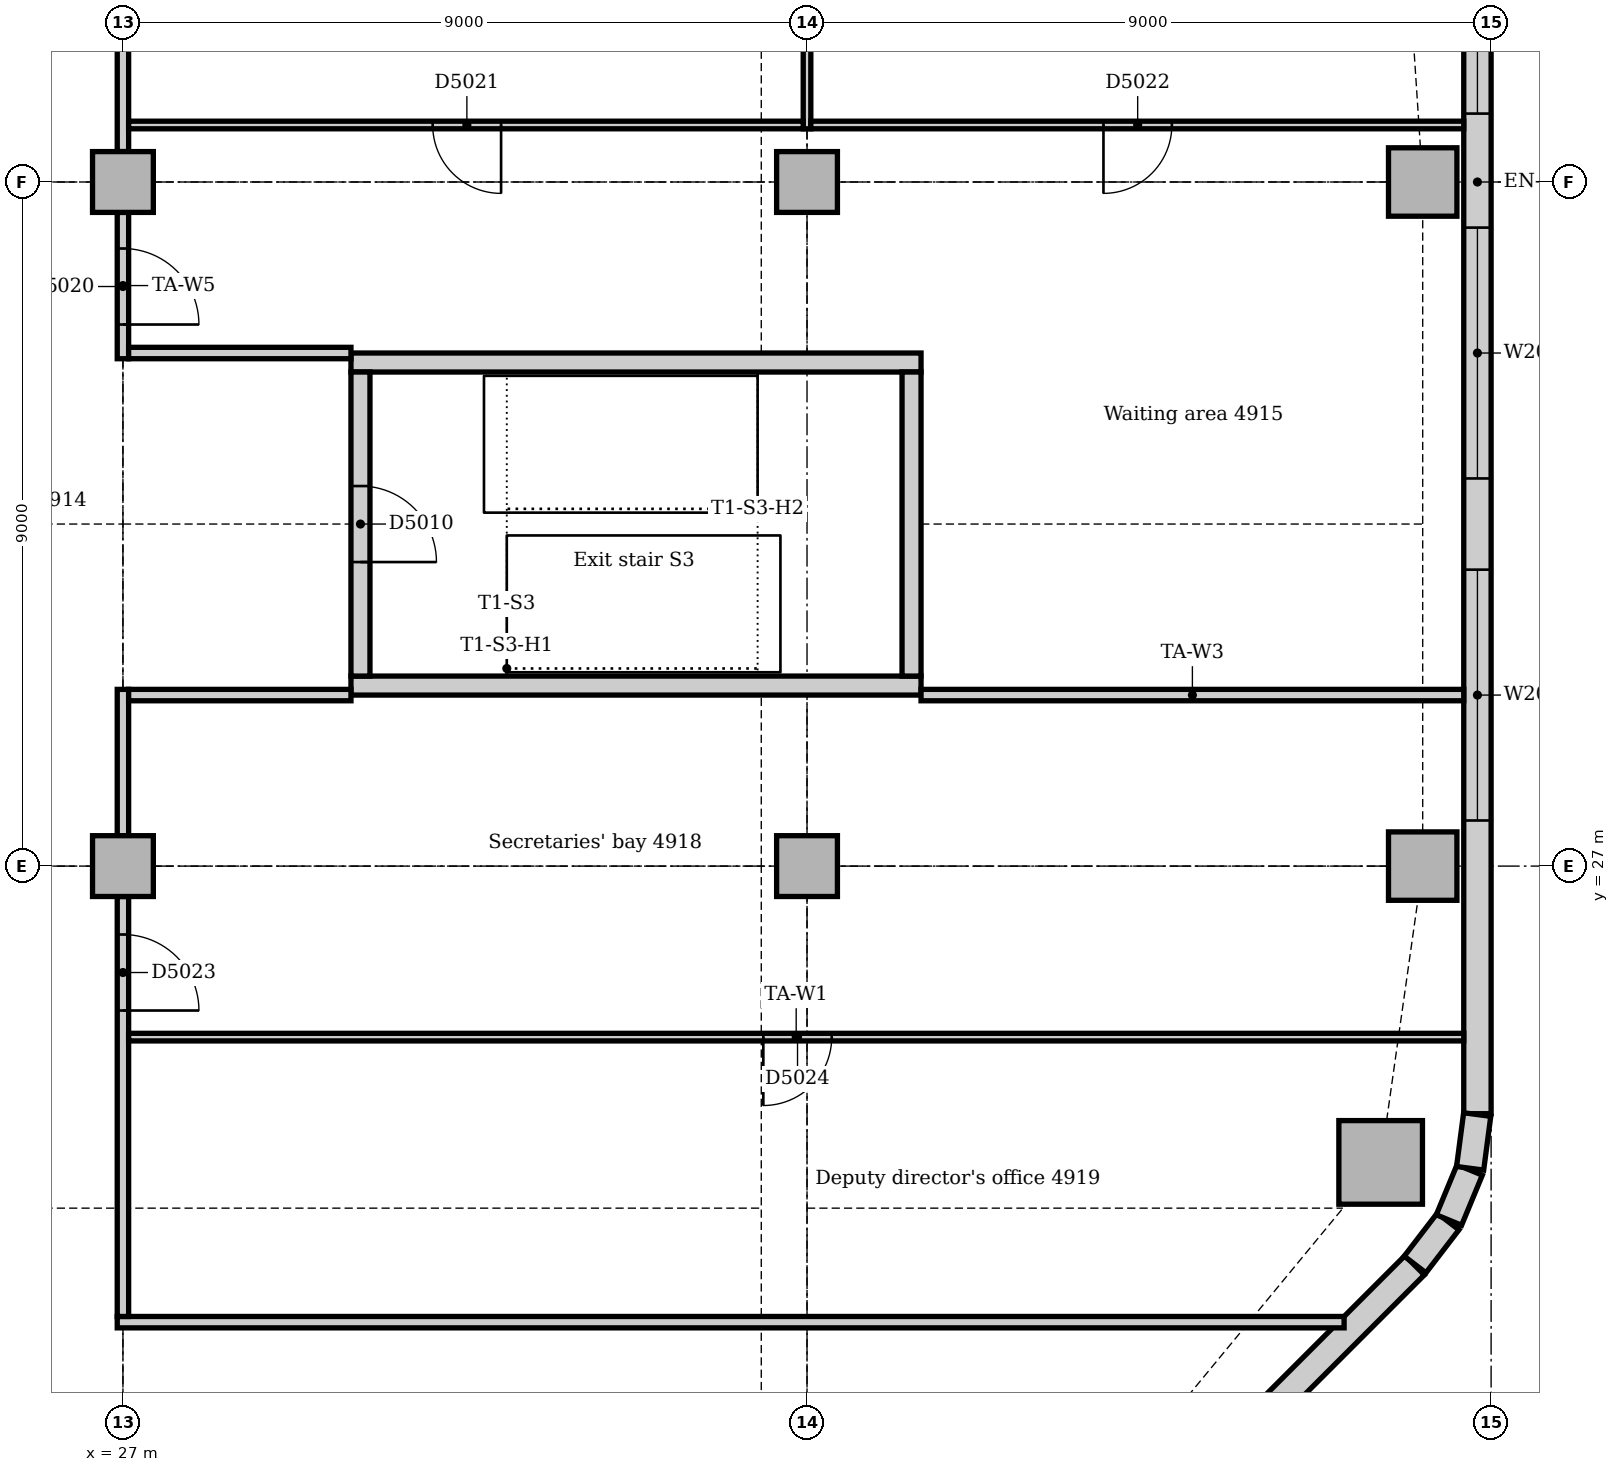
"""IFC4 building model, lengths in metres.
Left out: names, types, materials, properties, quantities, classifications, styles, units other than length and angle.
Written with IfcOpenShell. Run it as: python <this file> out.ifc"""

import sys

from ifc_helpers import new_model, si_unit, direction, frame, frame_2d, origin, origin_2d, place, context, subcontext, project, spatial, rectangle, extrude, element, fill, save


model = new_model("IFC4")
c1 = context("Model", 3, precision=1e-05, world=origin(), true_north=direction((0.0, 1.0)))
c2 = subcontext(c1, "Body", "Model", "MODEL_VIEW")
j1 = project(units=[si_unit("LENGTHUNIT", "METRE"), si_unit("PLANEANGLEUNIT", "RADIAN")], contexts=[c1])
p1 = place(None, origin())
s1 = spatial("IfcSite", under=j1, at=p1, CompositionType="ELEMENT")
p2 = place(p1, origin())
s2 = spatial("IfcBuilding", under=s1, at=p2, CompositionType="ELEMENT")
p3 = place(p2, frame((0.0, 0.0, 206.0)))
s3 = spatial("IfcBuildingStorey", under=s2, at=p3, CompositionType="ELEMENT", Elevation=206.0)
for number, where, z_axis, x_axis in (
    (1, (30.0, 29.375, 0.0), (0.0, 0.0, 1.0), (1.0, 0.0, 0.0)),
    (2, (37.5, 33.625, 0.0), (0.0, 0.0, 1.0), (-1.0, 0.0, 0.0)),
):
    element("IfcWall", number, at=place(p3, frame(where, z_axis=z_axis, x_axis=x_axis)), inside=s3, PredefinedType="SOLIDWALL", context=c2, shape_type="SweptSolid", body=[
        extrude(rectangle(XDim=7.5, YDim=0.25, at=frame_2d((3.75, 0.0))), origin(), (0.0, 0.0, 1.0), 4.0),
    ])
p4 = place(p3, frame((37.375, 29.5, 0.0), z_axis=(0.0, 0.0, 1.0), x_axis=(0.0, 1.0, 0.0)))
e3 = element("IfcWall", 3, at=p4, inside=s3, PredefinedType="SOLIDWALL", context=c2, shape_type="SweptSolid", body=[
    extrude(rectangle(XDim=4.0, YDim=0.25, at=frame_2d((2.0, 0.0))), origin(), (0.0, 0.0, 1.0), 4.0),
])
p5 = place(p3, frame((30.125, 33.5, 0.0), z_axis=(0.0, 0.0, 1.0), x_axis=(0.0, -1.0, 0.0)))
e4 = element("IfcWall", 4, at=p5, inside=s3, PredefinedType="SOLIDWALL", context=c2, shape_type="SweptSolid", body=[
    extrude(rectangle(XDim=4.0, YDim=0.25, at=frame_2d((2.0, 0.0))), origin(), (0.0, 0.0, 1.0), 4.0),
])
p6 = place(p5, frame((1.5, 0.0, 0.0)))
e5 = element("IfcOpeningElement", 5, at=p6, cuts=e4, PredefinedType="OPENING", context=c2, shape_type="SweptSolid", body=[
    extrude(rectangle(XDim=1.0, YDim=2.1, at=frame_2d((0.5, 1.05))), frame((0.0, 0.135, 0.0), z_axis=(0.0, -1.0, 0.0), x_axis=(1.0, 0.0, 0.0)), (0.0, 0.0, 1.0), 0.27),
])
p7 = place(p3, frame((43.547, 23.102, 0.0), z_axis=(0.0, 0.0, 1.0), x_axis=(1.0, 0.0, 0.0)))
e6 = element("IfcColumn", 6, at=p7, inside=s3, PredefinedType="COLUMN", context=c2, shape_type="SweptSolid", body=[
    extrude(rectangle(XDim=1.1, YDim=1.1, at=origin_2d()), origin(), (0.0, 0.0, 1.0), 3.85),
])
for number, where, z_axis, x_axis in (
    (7, (44.1, 27.0, 0.0), (0.0, 0.0, 1.0), (1.0, 0.0, 0.0)),
    (8, (44.1, 36.0, 0.0), (0.0, 0.0, 1.0), (1.0, 0.0, 0.0)),
):
    element("IfcColumn", number, at=place(p3, frame(where, z_axis=z_axis, x_axis=x_axis)), inside=s3, PredefinedType="COLUMN", context=c2, shape_type="SweptSolid", body=[
        extrude(rectangle(XDim=0.9, YDim=0.9, at=origin_2d()), origin(), (0.0, 0.0, 1.0), 3.85),
    ])
for number, where, z_axis, x_axis in (
    (9, (27.0, 27.0, 0.0), (0.0, 0.0, 1.0), (1.0, 0.0, 0.0)),
    (10, (27.0, 36.0, 0.0), (0.0, 0.0, 1.0), (1.0, 0.0, 0.0)),
    (11, (36.0, 27.0, 0.0), (0.0, 0.0, 1.0), (1.0, 0.0, 0.0)),
    (12, (36.0, 36.0, 0.0), (0.0, 0.0, 1.0), (1.0, 0.0, 0.0)),
):
    element("IfcColumn", number, at=place(p3, frame(where, z_axis=z_axis, x_axis=x_axis)), inside=s3, PredefinedType="COLUMN", context=c2, shape_type="SweptSolid", body=[
        extrude(rectangle(XDim=0.8, YDim=0.8, at=origin_2d()), origin(), (0.0, 0.0, 1.0), 3.85),
    ])
p8 = place(p3, frame((36.751, 14.506, 0.0), z_axis=(0.0, 0.0, 1.0), x_axis=(0.707106781187, 0.707106781187, 0.0)))
e13 = element("IfcWall", 13, at=p8, inside=s3, PredefinedType="STANDARD", context=c2, shape_type="SweptSolid", body=[
    extrude(rectangle(XDim=10.243, YDim=0.36, at=frame_2d((5.121, 0.0))), origin(), (0.0, 0.0, 1.0), 3.85),
])
p9 = place(p8, frame((5.021, 0.0, 0.9)))
e14 = element("IfcOpeningElement", 14, at=p9, cuts=e13, PredefinedType="OPENING", context=c2, shape_type="SweptSolid", body=[
    extrude(rectangle(XDim=1.8, YDim=1.6, at=frame_2d((0.9, 0.8))), frame((0.0, 0.19, 0.0), z_axis=(0.0, -1.0, 0.0), x_axis=(1.0, 0.0, 0.0)), (0.0, 0.0, 1.0), 0.38),
])
p10 = place(p3, frame((44.82, 23.743, 0.0), z_axis=(0.0, 0.0, 1.0), x_axis=(0.0, 1.0, 0.0)))
e15 = element("IfcWall", 15, at=p10, inside=s3, PredefinedType="STANDARD", context=c2, shape_type="SweptSolid", body=[
    extrude(rectangle(XDim=24.515, YDim=0.36, at=frame_2d((12.257, 0.0))), origin(), (0.0, 0.0, 1.0), 3.85),
])
p11 = place(p10, frame((3.857, 0.0, 0.9)))
e16 = element("IfcOpeningElement", 16, at=p11, cuts=e15, PredefinedType="OPENING", context=c2, shape_type="SweptSolid", body=[
    extrude(rectangle(XDim=3.3, YDim=1.6, at=frame_2d((1.65, 0.8))), frame((0.0, 0.19, 0.0), z_axis=(0.0, -1.0, 0.0), x_axis=(1.0, 0.0, 0.0)), (0.0, 0.0, 1.0), 0.38),
])
p12 = place(p10, frame((8.357, 0.0, 0.9)))
e17 = element("IfcOpeningElement", 17, at=p12, cuts=e15, PredefinedType="OPENING", context=c2, shape_type="SweptSolid", body=[
    extrude(rectangle(XDim=3.3, YDim=1.6, at=frame_2d((1.65, 0.8))), frame((0.0, 0.19, 0.0), z_axis=(0.0, -1.0, 0.0), x_axis=(1.0, 0.0, 0.0)), (0.0, 0.0, 1.0), 0.38),
])
p13 = place(p10, frame((13.157, 0.0, 0.9)))
e18 = element("IfcOpeningElement", 18, at=p13, cuts=e15, PredefinedType="OPENING", context=c2, shape_type="SweptSolid", body=[
    extrude(rectangle(XDim=3.3, YDim=1.6, at=frame_2d((1.65, 0.8))), frame((0.0, 0.19, 0.0), z_axis=(0.0, -1.0, 0.0), x_axis=(1.0, 0.0, 0.0)), (0.0, 0.0, 1.0), 0.38),
])
p14 = place(p10, frame((17.357, 0.0, 0.9)))
e19 = element("IfcOpeningElement", 19, at=p14, cuts=e15, PredefinedType="OPENING", context=c2, shape_type="SweptSolid", body=[
    extrude(rectangle(XDim=3.3, YDim=1.6, at=frame_2d((1.65, 0.8))), frame((0.0, 0.19, 0.0), z_axis=(0.0, -1.0, 0.0), x_axis=(1.0, 0.0, 0.0)), (0.0, 0.0, 1.0), 0.38),
])
p15 = place(p3, frame((44.0, 21.759, 0.0), z_axis=(0.0, 0.0, 1.0), x_axis=(0.608802368033, 0.793321924995, 0.0)))
e20 = element("IfcWall", 20, at=p15, inside=s3, PredefinedType="STANDARD", context=c2, shape_type="SweptSolid", body=[
    extrude(rectangle(XDim=0.713, YDim=0.36, at=frame_2d((0.357, 0.0))), origin(), (0.0, 0.0, 1.0), 3.85),
])
for number, where, z_axis, x_axis in (
    (21, (44.445, 22.344, 0.0), (0.0, 0.0, 1.0), (0.383, 0.924, 0.0)),
    (22, (44.724, 23.024, 0.0), (0.0, 0.0, 1.0), (0.131, 0.991, 0.0)),
):
    element("IfcWall", number, at=place(p3, frame(where, z_axis=z_axis, x_axis=x_axis)), inside=s3, PredefinedType="STANDARD", context=c2, shape_type="SweptSolid", body=[
        extrude(rectangle(XDim=0.713, YDim=0.36, at=frame_2d((0.356, 0.0))), origin(), (0.0, 0.0, 1.0), 3.85),
    ])
p16 = place(p3, frame((26.925, 21.0, 0.0), z_axis=(0.0, 0.0, 1.0), x_axis=(1.0, 0.0, 0.0)))
e23 = element("IfcWall", 23, at=p16, inside=s3, PredefinedType="PARTITIONING", context=c2, shape_type="SweptSolid", body=[
    extrude(rectangle(XDim=16.141, YDim=0.15, at=frame_2d((8.07, 0.0))), origin(), (0.0, 0.0, 1.0), 3.85),
])
p17 = place(p3, frame((27.0, 33.675, 0.0), z_axis=(0.0, 0.0, 1.0), x_axis=(0.0, 1.0, 0.0)))
e24 = element("IfcWall", 24, at=p17, inside=s3, PredefinedType="PARTITIONING", context=c2, shape_type="SweptSolid", body=[
    extrude(rectangle(XDim=1.925, YDim=0.15, at=frame_2d((0.963, 0.0))), origin(), (0.0, 0.0, 1.0), 3.35),
])
p18 = place(p17, frame((0.45, 0.0, 0.0)))
e25 = element("IfcOpeningElement", 25, at=p18, cuts=e24, PredefinedType="OPENING", context=c2, shape_type="SweptSolid", body=[
    extrude(rectangle(XDim=1.0, YDim=2.1, at=frame_2d((0.5, 1.05))), frame((0.0, 0.085, 0.0), z_axis=(0.0, -1.0, 0.0), x_axis=(1.0, 0.0, 0.0)), (0.0, 0.0, 1.0), 0.17),
])
p19 = place(p3, frame((27.0, 36.4, 0.0), z_axis=(0.0, 0.0, 1.0), x_axis=(0.0, 1.0, 0.0)))
e26 = element("IfcWall", 26, at=p19, inside=s3, PredefinedType="PARTITIONING", context=c2, shape_type="SweptSolid", body=[
    extrude(rectangle(XDim=7.3, YDim=0.15, at=frame_2d((3.65, 0.0))), origin(), (0.0, 0.0, 1.0), 3.35),
])
p20 = place(p3, frame((27.0, 21.075, 0.0), z_axis=(0.0, 0.0, 1.0), x_axis=(0.0, 1.0, 0.0)))
e27 = element("IfcWall", 27, at=p20, inside=s3, PredefinedType="PARTITIONING", context=c2, shape_type="SweptSolid", body=[
    extrude(rectangle(XDim=5.525, YDim=0.15, at=frame_2d((2.763, 0.0))), origin(), (0.0, 0.0, 1.0), 3.35),
])
p21 = place(p20, frame((4.025, 0.0, 0.0)))
e28 = element("IfcOpeningElement", 28, at=p21, cuts=e27, PredefinedType="OPENING", context=c2, shape_type="SweptSolid", body=[
    extrude(rectangle(XDim=1.0, YDim=2.1, at=frame_2d((0.5, 1.05))), frame((0.0, 0.085, 0.0), z_axis=(0.0, -1.0, 0.0), x_axis=(1.0, 0.0, 0.0)), (0.0, 0.0, 1.0), 0.17),
])
p22 = place(p3, frame((27.0, 27.4, 0.0), z_axis=(0.0, 0.0, 1.0), x_axis=(0.0, 1.0, 0.0)))
e29 = element("IfcWall", 29, at=p22, inside=s3, PredefinedType="PARTITIONING", context=c2, shape_type="SweptSolid", body=[
    extrude(rectangle(XDim=1.925, YDim=0.15, at=frame_2d((0.963, 0.0))), origin(), (0.0, 0.0, 1.0), 3.35),
])
for number, where, z_axis, x_axis in (
    (30, (27.075, 29.25, 0.0), (0.0, 0.0, 1.0), (1.0, 0.0, 0.0)),
    (31, (27.075, 33.75, 0.0), (0.0, 0.0, 1.0), (1.0, 0.0, 0.0)),
):
    element("IfcWall", number, at=place(p3, frame(where, z_axis=z_axis, x_axis=x_axis)), inside=s3, PredefinedType="PARTITIONING", context=c2, shape_type="SweptSolid", body=[
        extrude(rectangle(XDim=2.925, YDim=0.15, at=frame_2d((1.462, 0.0))), origin(), (0.0, 0.0, 1.0), 3.85),
    ])
p23 = place(p3, frame((37.5, 29.25, 0.0), z_axis=(0.0, 0.0, 1.0), x_axis=(1.0, 0.0, 0.0)))
e32 = element("IfcWall", 32, at=p23, inside=s3, PredefinedType="PARTITIONING", context=c2, shape_type="SweptSolid", body=[
    extrude(rectangle(XDim=7.14, YDim=0.15, at=frame_2d((3.57, 0.0))), origin(), (0.0, 0.0, 1.0), 3.85),
])
p24 = place(p3, frame((36.0, 36.7, 0.0), z_axis=(0.0, 0.0, 1.0), x_axis=(0.0, 1.0, 0.0)))
e33 = element("IfcWall", 33, at=p24, inside=s3, PredefinedType="PARTITIONING", context=c2, shape_type="SweptSolid", body=[
    extrude(rectangle(XDim=7.0, YDim=0.1, at=frame_2d((3.5, 0.0))), origin(), (0.0, 0.0, 1.0), 3.35),
])
p25 = place(p3, frame((27.075, 24.75, 0.0), z_axis=(0.0, 0.0, 1.0), x_axis=(1.0, 0.0, 0.0)))
e34 = element("IfcWall", 34, at=p25, inside=s3, PredefinedType="PARTITIONING", context=c2, shape_type="SweptSolid", body=[
    extrude(rectangle(XDim=17.565, YDim=0.1, at=frame_2d((8.783, 0.0))), origin(), (0.0, 0.0, 1.0), 3.85),
])
p26 = place(p25, frame((8.35, 0.0, 0.0)))
e35 = element("IfcOpeningElement", 35, at=p26, cuts=e34, PredefinedType="OPENING", context=c2, shape_type="SweptSolid", body=[
    extrude(rectangle(XDim=0.9, YDim=2.1, at=frame_2d((0.45, 1.05))), frame((0.0, 0.06, 0.0), z_axis=(0.0, -1.0, 0.0), x_axis=(1.0, 0.0, 0.0)), (0.0, 0.0, 1.0), 0.12),
])
p27 = place(p3, frame((27.075, 36.75, 0.0), z_axis=(0.0, 0.0, 1.0), x_axis=(1.0, 0.0, 0.0)))
e36 = element("IfcWall", 36, at=p27, inside=s3, PredefinedType="PARTITIONING", context=c2, shape_type="SweptSolid", body=[
    extrude(rectangle(XDim=8.875, YDim=0.1, at=frame_2d((4.438, 0.0))), origin(), (0.0, 0.0, 1.0), 3.85),
])
p28 = place(p27, frame((4.0, 0.0, 0.0)))
e37 = element("IfcOpeningElement", 37, at=p28, cuts=e36, PredefinedType="OPENING", context=c2, shape_type="SweptSolid", body=[
    extrude(rectangle(XDim=0.9, YDim=2.1, at=frame_2d((0.45, 1.05))), frame((0.0, 0.06, 0.0), z_axis=(0.0, -1.0, 0.0), x_axis=(1.0, 0.0, 0.0)), (0.0, 0.0, 1.0), 0.12),
])
p29 = place(p3, frame((36.05, 36.75, 0.0), z_axis=(0.0, 0.0, 1.0), x_axis=(1.0, 0.0, 0.0)))
e38 = element("IfcWall", 38, at=p29, inside=s3, PredefinedType="PARTITIONING", context=c2, shape_type="SweptSolid", body=[
    extrude(rectangle(XDim=8.59, YDim=0.1, at=frame_2d((4.295, 0.0))), origin(), (0.0, 0.0, 1.0), 3.85),
])
p30 = place(p29, frame((3.85, 0.0, 0.0)))
e39 = element("IfcOpeningElement", 39, at=p30, cuts=e38, PredefinedType="OPENING", context=c2, shape_type="SweptSolid", body=[
    extrude(rectangle(XDim=0.9, YDim=2.1, at=frame_2d((0.45, 1.05))), frame((0.0, 0.06, 0.0), z_axis=(0.0, -1.0, 0.0), x_axis=(1.0, 0.0, 0.0)), (0.0, 0.0, 1.0), 0.12),
])
p31 = place(p11, origin())
e40 = element("IfcWindow", 40, at=p31, inside=s3, PartitioningType="SINGLE_PANEL", PredefinedType="WINDOW", context=c2, shape_type="SweptSolid", body=[
    extrude(rectangle(XDim=3.3, YDim=1.6, at=frame_2d((1.65, 0.8))), frame((0.0, 0.13, 0.0), z_axis=(0.0, -1.0, 0.0), x_axis=(1.0, 0.0, 0.0)), (0.0, 0.0, 1.0), 0.06),
])
fill(e16, e40)
p32 = place(p12, origin())
e41 = element("IfcWindow", 41, at=p32, inside=s3, PartitioningType="SINGLE_PANEL", PredefinedType="WINDOW", context=c2, shape_type="SweptSolid", body=[
    extrude(rectangle(XDim=3.3, YDim=1.6, at=frame_2d((1.65, 0.8))), frame((0.0, 0.13, 0.0), z_axis=(0.0, -1.0, 0.0), x_axis=(1.0, 0.0, 0.0)), (0.0, 0.0, 1.0), 0.06),
])
fill(e17, e41)
p33 = place(p13, origin())
e42 = element("IfcWindow", 42, at=p33, inside=s3, PartitioningType="SINGLE_PANEL", PredefinedType="WINDOW", context=c2, shape_type="SweptSolid", body=[
    extrude(rectangle(XDim=3.3, YDim=1.6, at=frame_2d((1.65, 0.8))), frame((0.0, 0.13, 0.0), z_axis=(0.0, -1.0, 0.0), x_axis=(1.0, 0.0, 0.0)), (0.0, 0.0, 1.0), 0.06),
])
fill(e18, e42)
p34 = place(p6, origin())
e43 = element("IfcDoor", 43, at=p34, inside=s3, OperationType="SINGLE_SWING_RIGHT", PredefinedType="DOOR", context=c2, shape_type="SweptSolid", body=[
    extrude(rectangle(XDim=1.0, YDim=2.1, at=frame_2d((0.5, 1.05))), frame((0.0, 0.025, 0.0), z_axis=(0.0, -1.0, 0.0), x_axis=(1.0, 0.0, 0.0)), (0.0, 0.0, 1.0), 0.05),
])
fill(e5, e43)
p35 = place(p18, frame((1.0, 0.0, 0.0), z_axis=(0.0, 0.0, 1.0), x_axis=(-1.0, 0.0, 0.0)))
e44 = element("IfcDoor", 44, at=p35, inside=s3, OperationType="SINGLE_SWING_RIGHT", PredefinedType="DOOR", context=c2, shape_type="SweptSolid", body=[
    extrude(rectangle(XDim=1.0, YDim=2.1, at=frame_2d((0.5, 1.05))), frame((0.0, 0.025, 0.0), z_axis=(0.0, -1.0, 0.0), x_axis=(1.0, 0.0, 0.0)), (0.0, 0.0, 1.0), 0.05),
])
fill(e25, e44)
p36 = place(p28, frame((0.9, 0.0, 0.0), z_axis=(0.0, 0.0, 1.0), x_axis=(-1.0, 0.0, 0.0)))
e45 = element("IfcDoor", 45, at=p36, inside=s3, OperationType="SINGLE_SWING_LEFT", PredefinedType="DOOR", context=c2, shape_type="SweptSolid", body=[
    extrude(rectangle(XDim=0.9, YDim=2.1, at=frame_2d((0.45, 1.05))), frame((0.0, 0.025, 0.0), z_axis=(0.0, -1.0, 0.0), x_axis=(1.0, 0.0, 0.0)), (0.0, 0.0, 1.0), 0.05),
])
fill(e37, e45)
p37 = place(p30, frame((0.9, 0.0, 0.0), z_axis=(0.0, 0.0, 1.0), x_axis=(-1.0, 0.0, 0.0)))
e46 = element("IfcDoor", 46, at=p37, inside=s3, OperationType="SINGLE_SWING_RIGHT", PredefinedType="DOOR", context=c2, shape_type="SweptSolid", body=[
    extrude(rectangle(XDim=0.9, YDim=2.1, at=frame_2d((0.45, 1.05))), frame((0.0, 0.025, 0.0), z_axis=(0.0, -1.0, 0.0), x_axis=(1.0, 0.0, 0.0)), (0.0, 0.0, 1.0), 0.05),
])
fill(e39, e46)
p38 = place(p21, frame((1.0, 0.0, 0.0), z_axis=(0.0, 0.0, 1.0), x_axis=(-1.0, 0.0, 0.0)))
e47 = element("IfcDoor", 47, at=p38, inside=s3, OperationType="SINGLE_SWING_RIGHT", PredefinedType="DOOR", context=c2, shape_type="SweptSolid", body=[
    extrude(rectangle(XDim=1.0, YDim=2.1, at=frame_2d((0.5, 1.05))), frame((0.0, 0.025, 0.0), z_axis=(0.0, -1.0, 0.0), x_axis=(1.0, 0.0, 0.0)), (0.0, 0.0, 1.0), 0.05),
])
fill(e28, e47)
p39 = place(p26, frame((0.9, 0.0, 0.0), z_axis=(0.0, 0.0, 1.0), x_axis=(-1.0, 0.0, 0.0)))
e48 = element("IfcDoor", 48, at=p39, inside=s3, OperationType="SINGLE_SWING_RIGHT", PredefinedType="DOOR", context=c2, shape_type="SweptSolid", body=[
    extrude(rectangle(XDim=0.9, YDim=2.1, at=frame_2d((0.45, 1.05))), frame((0.0, 0.025, 0.0), z_axis=(0.0, -1.0, 0.0), x_axis=(1.0, 0.0, 0.0)), (0.0, 0.0, 1.0), 0.05),
])
fill(e35, e48)
save(model, sys.argv[1])
